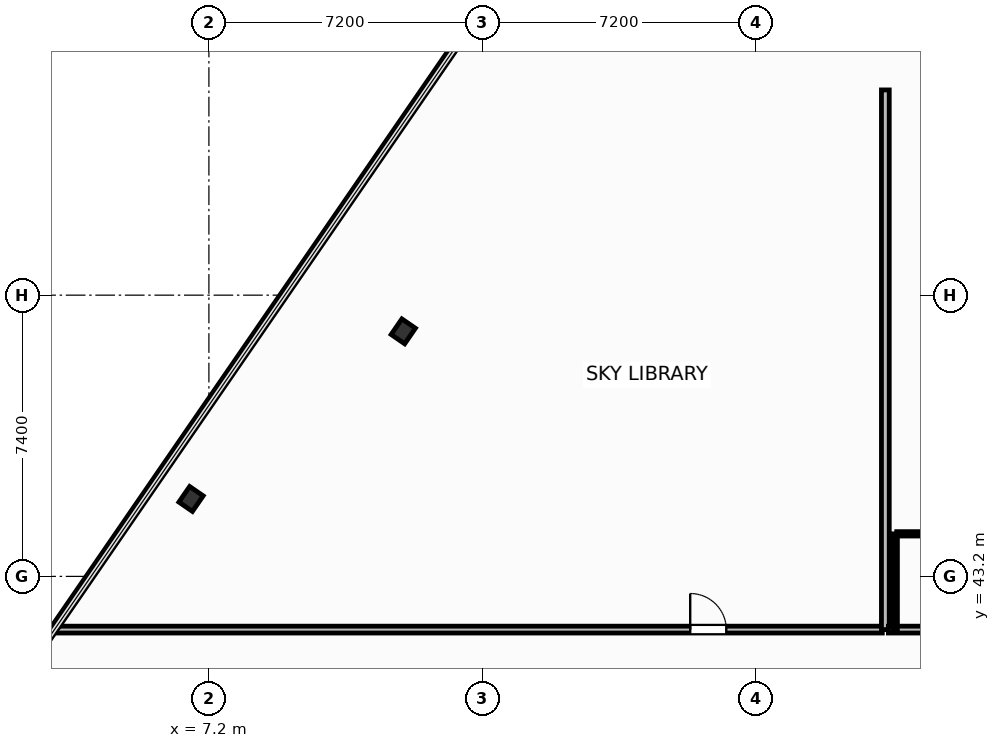
"""IFC4 building model, lengths in metres.
Left out: names, types, materials, properties, quantities, classifications, styles, units other than length and angle.
Written with IfcOpenShell. Run it as: python <this file> out.ifc"""

import sys

from ifc_helpers import new_model, si_unit, direction, frame, frame_2d, origin, origin_2d, place, context, subcontext, project, spatial, rectangle, i_section, extrude, element, fill, save


model = new_model("IFC4")
c1 = context("Model", 3, precision=1e-05, world=origin(), true_north=direction((0.0, 1.0)))
c2 = subcontext(c1, "Body", "Model", "MODEL_VIEW")
j1 = project(units=[si_unit("LENGTHUNIT", "METRE"), si_unit("PLANEANGLEUNIT", "RADIAN")], contexts=[c1])
p1 = place(None, origin())
s1 = spatial("IfcSite", under=j1, at=p1, CompositionType="ELEMENT")
p2 = place(p1, origin())
s2 = spatial("IfcBuilding", under=s1, at=p2, CompositionType="ELEMENT")
p3 = place(p2, frame((0.0, 0.0, 67.7)))
s3 = spatial("IfcBuildingStorey", under=s2, at=p3, CompositionType="ELEMENT", Elevation=67.7)
for number, where, z_axis, x_axis in (
    (1, (12.315, 49.647, 0.0), (0.0, 0.0, 1.0), (0.824, -0.567, 0.0)),
    (2, (6.73, 45.238, 0.0), (0.0, 0.0, 1.0), (0.824, -0.567, 0.0)),
):
    element("IfcColumn", number, at=place(p3, frame(where, z_axis=z_axis, x_axis=x_axis)), inside=s3, PredefinedType="COLUMN", context=c2, shape_type="SweptSolid", body=[
        extrude(i_section(OverallWidth=0.432, OverallDepth=0.498, WebThickness=0.056, FlangeThickness=0.089, FilletRadius=0.025, at=origin_2d()), origin(), (0.0, 0.0, 1.0), 3.7),
    ])
p4 = place(p3, frame((44.882, 51.962, 0.0), z_axis=(0.0, 0.0, 1.0), x_axis=(-0.823534427573, 0.567266292497, 0.0)))
e3 = element("IfcWall", 3, at=p4, inside=s3, PredefinedType="SOLIDWALL", context=c2, shape_type="SweptSolid", body=[
    extrude(rectangle(XDim=23.147, YDim=0.22, at=frame_2d((11.574, 0.0))), origin(), (0.0, 0.0, 1.0), 2.66),
])
p5 = place(p4, frame((10.749, 0.0, 0.8)))
e4 = element("IfcOpeningElement", 4, at=p5, cuts=e3, PredefinedType="OPENING", context=c2, shape_type="SweptSolid", body=[
    extrude(rectangle(XDim=1.65, YDim=1.65, at=frame_2d((0.825, 0.825))), frame((0.0, 0.12, 0.0), z_axis=(0.0, -1.0, 0.0), x_axis=(1.0, 0.0, 0.0)), (0.0, 0.0, 1.0), 0.24),
])
p6 = place(p3, frame((3.176, 41.8, 0.0), z_axis=(0.0, 0.0, 1.0), x_axis=(1.0, 0.0, 0.0)))
e5 = element("IfcWall", 5, at=p6, inside=s3, PredefinedType="PARTITIONING", context=c2, shape_type="SweptSolid", body=[
    extrude(rectangle(XDim=21.744, YDim=0.18, at=frame_2d((10.872, 0.0))), origin(), (0.0, 0.0, 1.0), 3.38),
])
p7 = place(p6, frame((16.689, 0.0, 0.0)))
e6 = element("IfcOpeningElement", 6, at=p7, cuts=e5, PredefinedType="OPENING", context=c2, shape_type="SweptSolid", body=[
    extrude(rectangle(XDim=0.95, YDim=2.05, at=frame_2d((0.475, 1.025))), frame((0.0, 0.1, 0.0), z_axis=(0.0, -1.0, 0.0), x_axis=(1.0, 0.0, 0.0)), (0.0, 0.0, 1.0), 0.2),
])
p8 = place(p3, frame((25.0, 41.8, 0.0), z_axis=(0.0, 0.0, 1.0), x_axis=(0.0, 1.0, 0.0)))
e7 = element("IfcWall", 7, at=p8, inside=s3, PredefinedType="PARTITIONING", context=c2, shape_type="SweptSolid", body=[
    extrude(rectangle(XDim=14.2, YDim=0.205, at=frame_2d((7.1, 0.0))), origin(), (0.0, 0.0, 1.0), 3.38),
])
p9 = place(p3, frame((25.08, 41.8, 0.0), z_axis=(0.0, 0.0, 1.0), x_axis=(1.0, 0.0, 0.0)))
e8 = element("IfcWall", 8, at=p9, inside=s3, PredefinedType="PARTITIONING", context=c2, shape_type="SweptSolid", body=[
    extrude(rectangle(XDim=6.34, YDim=0.18, at=frame_2d((3.17, 0.0))), origin(), (0.0, 0.0, 1.0), 3.38),
])
p10 = place(p9, frame((3.274, 0.0, 0.0)))
e9 = element("IfcOpeningElement", 9, at=p10, cuts=e8, PredefinedType="OPENING", context=c2, shape_type="SweptSolid", body=[
    extrude(rectangle(XDim=0.95, YDim=2.15, at=frame_2d((0.475, 1.075))), frame((0.0, 0.1, 0.0), z_axis=(0.0, -1.0, 0.0), x_axis=(1.0, 0.0, 0.0)), (0.0, 0.0, 1.0), 0.2),
])
p11 = place(p3, frame((25.3, 44.32, 0.0), z_axis=(0.0, 0.0, 1.0), x_axis=(1.0, 0.0, 0.0)))
e10 = element("IfcWall", 10, at=p11, inside=s3, PredefinedType="PARTITIONING", context=c2, shape_type="SweptSolid", body=[
    extrude(rectangle(XDim=2.124, YDim=0.115, at=frame_2d((1.062, 0.0))), origin(), (0.0, 0.0, 1.0), 3.38),
])
p12 = place(p3, frame((25.26, 41.8, 0.0), z_axis=(0.0, 0.0, 1.0), x_axis=(0.0, 1.0, 0.0)))
e11 = element("IfcWall", 11, at=p12, inside=s3, PredefinedType="PARTITIONING", context=c2, shape_type="SweptSolid", body=[
    extrude(rectangle(XDim=2.52, YDim=0.115, at=frame_2d((1.26, 0.0))), origin(), (0.0, 0.0, 1.0), 3.38),
])
p13 = place(p7, origin())
e12 = element("IfcDoor", 12, at=p13, inside=s3, OperationType="SINGLE_SWING_LEFT", PredefinedType="DOOR", context=c2, shape_type="SweptSolid", body=[
    extrude(rectangle(XDim=0.95, YDim=2.05, at=frame_2d((0.475, 1.025))), frame((0.0, 0.025, 0.0), z_axis=(0.0, -1.0, 0.0), x_axis=(1.0, 0.0, 0.0)), (0.0, 0.0, 1.0), 0.05),
])
fill(e6, e12)
save(model, sys.argv[1])
